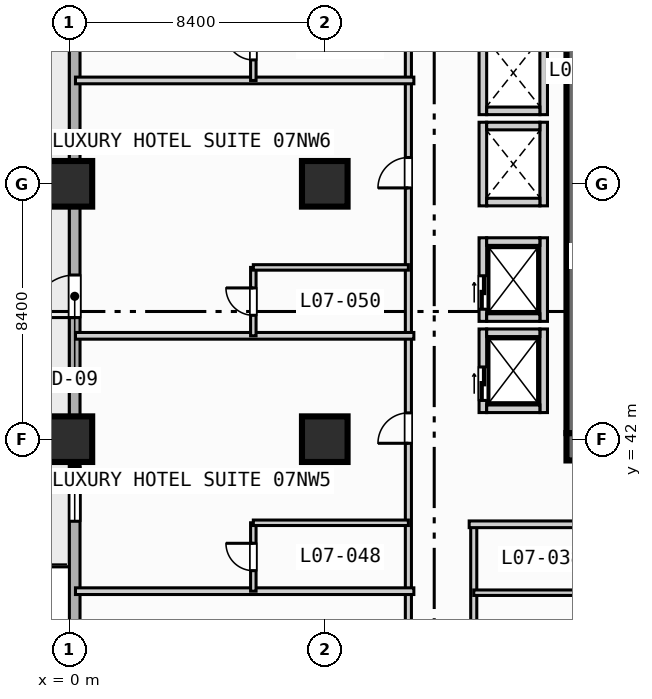
"""IFC4 building model, lengths in metres.
Left out: names, types, materials, properties, quantities, classifications, styles, units other than length and angle.
Written with IfcOpenShell. Run it as: python <this file> out.ifc"""

import sys

from ifc_helpers import new_model, si_unit, direction, frame, frame_2d, origin, origin_2d, place, context, subcontext, project, spatial, rectangle, extrude, element, fill, save


model = new_model("IFC4")
c1 = context("Model", 3, precision=1e-05, world=origin(), true_north=direction((0.0, 1.0)))
c2 = subcontext(c1, "Body", "Model", "MODEL_VIEW")
j1 = project(units=[si_unit("LENGTHUNIT", "METRE"), si_unit("PLANEANGLEUNIT", "RADIAN")], contexts=[c1])
p1 = place(None, origin())
s1 = spatial("IfcSite", under=j1, at=p1, CompositionType="ELEMENT")
p2 = place(p1, origin())
s2 = spatial("IfcBuilding", under=s1, at=p2, CompositionType="ELEMENT")
p3 = place(p2, frame((0.0, 0.0, 35.8)))
s3 = spatial("IfcBuildingStorey", under=s2, at=p3, CompositionType="ELEMENT", Elevation=35.8)
p4 = place(p3, frame((16.35, 41.75, 0.0), z_axis=(0.0, 0.0, 1.0), x_axis=(1.0, 0.0, 0.0)))
e1 = element("IfcWall", 1, at=p4, inside=s3, PredefinedType="SHEAR", context=c2, shape_type="SweptSolid", body=[
    extrude(rectangle(XDim=1.65, YDim=0.9, at=frame_2d((0.825, 0.0))), origin(), (0.0, 0.0, 1.0), 3.55),
])
p5 = place(p3, frame((16.8, 42.2, 0.0), z_axis=(0.0, 0.0, 1.0), x_axis=(0.0, 1.0, 0.0)))
e2 = element("IfcWall", 2, at=p5, inside=s3, PredefinedType="SHEAR", context=c2, shape_type="SweptSolid", body=[
    extrude(rectangle(XDim=16.35, YDim=0.9, at=frame_2d((8.175, 0.0))), origin(), (0.0, 0.0, 1.0), 3.55),
])
for number, where, z_axis, x_axis in (
    (3, (0.0, 42.0, 0.0), (0.0, 0.0, 1.0), (1.0, 0.0, 0.0)),
    (4, (0.0, 50.4, 0.0), (0.0, 0.0, 1.0), (1.0, 0.0, 0.0)),
    (5, (8.4, 42.0, 0.0), (0.0, 0.0, 1.0), (1.0, 0.0, 0.0)),
    (6, (8.4, 50.4, 0.0), (0.0, 0.0, 1.0), (1.0, 0.0, 0.0)),
):
    element("IfcColumn", number, at=place(p3, frame(where, z_axis=z_axis, x_axis=x_axis)), inside=s3, PredefinedType="COLUMN", context=c2, shape_type="SweptSolid", body=[
        extrude(rectangle(XDim=1.5, YDim=1.5, at=origin_2d()), origin(), (0.0, 0.0, 1.0), 3.8),
    ])
p6 = place(p3, frame((0.175, 3.175, 0.0), z_axis=(0.0, 0.0, 1.0), x_axis=(0.0, 1.0, 0.0)))
e7 = element("IfcWall", 7, at=p6, inside=s3, PredefinedType="STANDARD", context=c2, shape_type="SweptSolid", body=[
    extrude(rectangle(XDim=86.05, YDim=0.35, at=frame_2d((43.025, 0.0))), origin(), (0.0, 0.0, 1.0), 3.55),
])
p7 = place(p6, frame((42.825, 0.0, 0.0)))
e8 = element("IfcOpeningElement", 8, at=p7, cuts=e7, PredefinedType="OPENING", context=c2, shape_type="SweptSolid", body=[
    extrude(rectangle(XDim=1.4, YDim=2.2, at=frame_2d((0.7, 1.1))), frame((0.0, 0.185, 0.0), z_axis=(0.0, -1.0, 0.0), x_axis=(1.0, 0.0, 0.0)), (0.0, 0.0, 1.0), 0.37),
])
p8 = place(p6, frame((2.525, 0.0, 0.85)))
e9 = element("IfcOpeningElement", 9, at=p8, cuts=e7, PredefinedType="OPENING", context=c2, shape_type="SweptSolid", body=[
    extrude(rectangle(XDim=1.8, YDim=1.8, at=frame_2d((0.9, 0.9))), frame((0.0, 0.185, 0.0), z_axis=(0.0, -1.0, 0.0), x_axis=(1.0, 0.0, 0.0)), (0.0, 0.0, 1.0), 0.37),
])
p9 = place(p6, frame((10.925, 0.0, 0.85)))
e10 = element("IfcOpeningElement", 10, at=p9, cuts=e7, PredefinedType="OPENING", context=c2, shape_type="SweptSolid", body=[
    extrude(rectangle(XDim=1.8, YDim=1.8, at=frame_2d((0.9, 0.9))), frame((0.0, 0.185, 0.0), z_axis=(0.0, -1.0, 0.0), x_axis=(1.0, 0.0, 0.0)), (0.0, 0.0, 1.0), 0.37),
])
p10 = place(p6, frame((19.325, 0.0, 0.85)))
e11 = element("IfcOpeningElement", 11, at=p10, cuts=e7, PredefinedType="OPENING", context=c2, shape_type="SweptSolid", body=[
    extrude(rectangle(XDim=1.8, YDim=1.8, at=frame_2d((0.9, 0.9))), frame((0.0, 0.185, 0.0), z_axis=(0.0, -1.0, 0.0), x_axis=(1.0, 0.0, 0.0)), (0.0, 0.0, 1.0), 0.37),
])
p11 = place(p6, frame((27.725, 0.0, 0.85)))
e12 = element("IfcOpeningElement", 12, at=p11, cuts=e7, PredefinedType="OPENING", context=c2, shape_type="SweptSolid", body=[
    extrude(rectangle(XDim=1.8, YDim=1.8, at=frame_2d((0.9, 0.9))), frame((0.0, 0.185, 0.0), z_axis=(0.0, -1.0, 0.0), x_axis=(1.0, 0.0, 0.0)), (0.0, 0.0, 1.0), 0.37),
])
p12 = place(p6, frame((36.125, 0.0, 0.85)))
e13 = element("IfcOpeningElement", 13, at=p12, cuts=e7, PredefinedType="OPENING", context=c2, shape_type="SweptSolid", body=[
    extrude(rectangle(XDim=1.8, YDim=1.8, at=frame_2d((0.9, 0.9))), frame((0.0, 0.185, 0.0), z_axis=(0.0, -1.0, 0.0), x_axis=(1.0, 0.0, 0.0)), (0.0, 0.0, 1.0), 0.37),
])
p13 = place(p6, frame((52.925, 0.0, 0.85)))
e14 = element("IfcOpeningElement", 14, at=p13, cuts=e7, PredefinedType="OPENING", context=c2, shape_type="SweptSolid", body=[
    extrude(rectangle(XDim=1.8, YDim=1.8, at=frame_2d((0.9, 0.9))), frame((0.0, 0.185, 0.0), z_axis=(0.0, -1.0, 0.0), x_axis=(1.0, 0.0, 0.0)), (0.0, 0.0, 1.0), 0.37),
])
p14 = place(p6, frame((61.325, 0.0, 0.85)))
e15 = element("IfcOpeningElement", 15, at=p14, cuts=e7, PredefinedType="OPENING", context=c2, shape_type="SweptSolid", body=[
    extrude(rectangle(XDim=1.8, YDim=1.8, at=frame_2d((0.9, 0.9))), frame((0.0, 0.185, 0.0), z_axis=(0.0, -1.0, 0.0), x_axis=(1.0, 0.0, 0.0)), (0.0, 0.0, 1.0), 0.37),
])
p15 = place(p6, frame((69.725, 0.0, 0.85)))
e16 = element("IfcOpeningElement", 16, at=p15, cuts=e7, PredefinedType="OPENING", context=c2, shape_type="SweptSolid", body=[
    extrude(rectangle(XDim=1.8, YDim=1.8, at=frame_2d((0.9, 0.9))), frame((0.0, 0.185, 0.0), z_axis=(0.0, -1.0, 0.0), x_axis=(1.0, 0.0, 0.0)), (0.0, 0.0, 1.0), 0.37),
])
p16 = place(p6, frame((78.075, 0.0, 0.85)))
e17 = element("IfcOpeningElement", 17, at=p16, cuts=e7, PredefinedType="OPENING", context=c2, shape_type="SweptSolid", body=[
    extrude(rectangle(XDim=1.8, YDim=1.8, at=frame_2d((0.9, 0.9))), frame((0.0, 0.185, 0.0), z_axis=(0.0, -1.0, 0.0), x_axis=(1.0, 0.0, 0.0)), (0.0, 0.0, 1.0), 0.37),
])
p17 = place(p3, frame((13.6, 42.875, 0.0), z_axis=(0.0, 0.0, 1.0), x_axis=(0.0, 1.0, 0.0)))
e18 = element("IfcWall", 18, at=p17, inside=s3, PredefinedType="SOLIDWALL", context=c2, shape_type="SweptSolid", body=[
    extrude(rectangle(XDim=2.75, YDim=0.25, at=frame_2d((1.375, 0.0))), origin(), (0.0, 0.0, 1.0), 3.55),
])
p18 = place(p17, frame((0.4, 0.0, 0.0)))
e19 = element("IfcOpeningElement", 19, at=p18, cuts=e18, PredefinedType="OPENING", context=c2, shape_type="SweptSolid", body=[
    extrude(rectangle(XDim=1.1, YDim=2.15, at=frame_2d((0.55, 1.075))), frame((0.0, 0.135, 0.0), z_axis=(0.0, -1.0, 0.0), x_axis=(1.0, 0.0, 0.0)), (0.0, 0.0, 1.0), 0.27),
])
p19 = place(p3, frame((15.6, 42.875, 0.0), z_axis=(0.0, 0.0, 1.0), x_axis=(0.0, 1.0, 0.0)))
e20 = element("IfcWall", 20, at=p19, inside=s3, PredefinedType="SOLIDWALL", context=c2, shape_type="SweptSolid", body=[
    extrude(rectangle(XDim=2.75, YDim=0.25, at=frame_2d((1.375, 0.0))), origin(), (0.0, 0.0, 1.0), 3.55),
])
for number, where, z_axis, x_axis in (
    (21, (13.725, 43.0, 0.0), (0.0, 0.0, 1.0), (1.0, 0.0, 0.0)),
    (22, (13.725, 45.5, 0.0), (0.0, 0.0, 1.0), (1.0, 0.0, 0.0)),
):
    element("IfcWall", number, at=place(p3, frame(where, z_axis=z_axis, x_axis=x_axis)), inside=s3, PredefinedType="SOLIDWALL", context=c2, shape_type="SweptSolid", body=[
        extrude(rectangle(XDim=1.75, YDim=0.25, at=frame_2d((0.875, 0.0))), origin(), (0.0, 0.0, 1.0), 3.55),
    ])
p20 = place(p3, frame((13.6, 45.875, 0.0), z_axis=(0.0, 0.0, 1.0), x_axis=(0.0, 1.0, 0.0)))
e23 = element("IfcWall", 23, at=p20, inside=s3, PredefinedType="SOLIDWALL", context=c2, shape_type="SweptSolid", body=[
    extrude(rectangle(XDim=2.75, YDim=0.25, at=frame_2d((1.375, 0.0))), origin(), (0.0, 0.0, 1.0), 3.55),
])
p21 = place(p20, frame((0.4, 0.0, 0.0)))
e24 = element("IfcOpeningElement", 24, at=p21, cuts=e23, PredefinedType="OPENING", context=c2, shape_type="SweptSolid", body=[
    extrude(rectangle(XDim=1.1, YDim=2.15, at=frame_2d((0.55, 1.075))), frame((0.0, 0.135, 0.0), z_axis=(0.0, -1.0, 0.0), x_axis=(1.0, 0.0, 0.0)), (0.0, 0.0, 1.0), 0.27),
])
p22 = place(p3, frame((15.6, 45.875, 0.0), z_axis=(0.0, 0.0, 1.0), x_axis=(0.0, 1.0, 0.0)))
e25 = element("IfcWall", 25, at=p22, inside=s3, PredefinedType="SOLIDWALL", context=c2, shape_type="SweptSolid", body=[
    extrude(rectangle(XDim=2.75, YDim=0.25, at=frame_2d((1.375, 0.0))), origin(), (0.0, 0.0, 1.0), 3.55),
])
for number, where, z_axis, x_axis in (
    (26, (13.725, 46.0, 0.0), (0.0, 0.0, 1.0), (1.0, 0.0, 0.0)),
    (27, (13.725, 48.5, 0.0), (0.0, 0.0, 1.0), (1.0, 0.0, 0.0)),
):
    element("IfcWall", number, at=place(p3, frame(where, z_axis=z_axis, x_axis=x_axis)), inside=s3, PredefinedType="SOLIDWALL", context=c2, shape_type="SweptSolid", body=[
        extrude(rectangle(XDim=1.75, YDim=0.25, at=frame_2d((0.875, 0.0))), origin(), (0.0, 0.0, 1.0), 3.55),
    ])
for number, where, z_axis, x_axis in (
    (28, (13.6, 49.675, 0.0), (0.0, 0.0, 1.0), (0.0, 1.0, 0.0)),
    (29, (15.6, 49.675, 0.0), (0.0, 0.0, 1.0), (0.0, 1.0, 0.0)),
):
    element("IfcWall", number, at=place(p3, frame(where, z_axis=z_axis, x_axis=x_axis)), inside=s3, PredefinedType="SOLIDWALL", context=c2, shape_type="SweptSolid", body=[
        extrude(rectangle(XDim=2.75, YDim=0.25, at=frame_2d((1.375, 0.0))), origin(), (0.0, 0.0, 1.0), 3.55),
    ])
for number, where, z_axis, x_axis in (
    (30, (13.725, 49.8, 0.0), (0.0, 0.0, 1.0), (1.0, 0.0, 0.0)),
    (31, (13.725, 52.3, 0.0), (0.0, 0.0, 1.0), (1.0, 0.0, 0.0)),
):
    element("IfcWall", number, at=place(p3, frame(where, z_axis=z_axis, x_axis=x_axis)), inside=s3, PredefinedType="SOLIDWALL", context=c2, shape_type="SweptSolid", body=[
        extrude(rectangle(XDim=1.75, YDim=0.25, at=frame_2d((0.875, 0.0))), origin(), (0.0, 0.0, 1.0), 3.55),
    ])
for number, where, z_axis, x_axis in (
    (32, (13.6, 52.675, 0.0), (0.0, 0.0, 1.0), (0.0, 1.0, 0.0)),
    (33, (15.6, 52.675, 0.0), (0.0, 0.0, 1.0), (0.0, 1.0, 0.0)),
):
    element("IfcWall", number, at=place(p3, frame(where, z_axis=z_axis, x_axis=x_axis)), inside=s3, PredefinedType="SOLIDWALL", context=c2, shape_type="SweptSolid", body=[
        extrude(rectangle(XDim=2.75, YDim=0.25, at=frame_2d((1.375, 0.0))), origin(), (0.0, 0.0, 1.0), 3.55),
    ])
p23 = place(p3, frame((13.725, 52.8, 0.0), z_axis=(0.0, 0.0, 1.0), x_axis=(1.0, 0.0, 0.0)))
e34 = element("IfcWall", 34, at=p23, inside=s3, PredefinedType="SOLIDWALL", context=c2, shape_type="SweptSolid", body=[
    extrude(rectangle(XDim=1.75, YDim=0.25, at=frame_2d((0.875, 0.0))), origin(), (0.0, 0.0, 1.0), 3.55),
])
p24 = place(p3, frame((13.3, 25.6, 0.0), z_axis=(0.0, 0.0, 1.0), x_axis=(0.0, 1.0, 0.0)))
e35 = element("IfcWall", 35, at=p24, inside=s3, PredefinedType="PARTITIONING", context=c2, shape_type="SweptSolid", body=[
    extrude(rectangle(XDim=13.6, YDim=0.2, at=frame_2d((6.8, 0.0))), origin(), (0.0, 0.0, 1.0), 3.55),
])
p25 = place(p24, frame((1.735, 0.0, 0.0)))
e36 = element("IfcOpeningElement", 36, at=p25, cuts=e35, PredefinedType="OPENING", context=c2, shape_type="SweptSolid", body=[
    extrude(rectangle(XDim=1.0, YDim=2.15, at=frame_2d((0.5, 1.075))), frame((0.0, 0.11, 0.0), z_axis=(0.0, -1.0, 0.0), x_axis=(1.0, 0.0, 0.0)), (0.0, 0.0, 1.0), 0.22),
])
p26 = place(p24, frame((8.535, 0.0, 0.0)))
e37 = element("IfcOpeningElement", 37, at=p26, cuts=e35, PredefinedType="OPENING", context=c2, shape_type="SweptSolid", body=[
    extrude(rectangle(XDim=1.0, YDim=2.15, at=frame_2d((0.5, 1.075))), frame((0.0, 0.11, 0.0), z_axis=(0.0, -1.0, 0.0), x_axis=(1.0, 0.0, 0.0)), (0.0, 0.0, 1.0), 0.22),
])
p27 = place(p3, frame((13.15, 39.2, 0.0), z_axis=(0.0, 0.0, 1.0), x_axis=(1.0, 0.0, 0.0)))
e38 = element("IfcWall", 38, at=p27, inside=s3, PredefinedType="PARTITIONING", context=c2, shape_type="SweptSolid", body=[
    extrude(rectangle(XDim=20.28, YDim=0.22, at=frame_2d((10.14, 0.0))), origin(), (0.0, 0.0, 1.0), 3.55),
])
p28 = place(p3, frame((13.3, 36.95, 0.0), z_axis=(0.0, 0.0, 1.0), x_axis=(1.0, 0.0, 0.0)))
e39 = element("IfcWall", 39, at=p28, inside=s3, PredefinedType="PLUMBINGWALL", context=c2, shape_type="SweptSolid", body=[
    extrude(rectangle(XDim=5.1, YDim=0.18, at=frame_2d((2.55, 0.0))), origin(), (0.0, 0.0, 1.0), 3.55),
])
p29 = place(p3, frame((11.15, 3.4, 0.0), z_axis=(0.0, 0.0, 1.0), x_axis=(0.0, 1.0, 0.0)))
e40 = element("IfcWall", 40, at=p29, inside=s3, PredefinedType="PARTITIONING", context=c2, shape_type="SweptSolid", body=[
    extrude(rectangle(XDim=85.4, YDim=0.2, at=frame_2d((42.7, 0.0))), origin(), (0.0, 0.0, 1.0), 3.55),
])
p30 = place(p29, frame((4.865, 0.0, 0.0)))
e41 = element("IfcOpeningElement", 41, at=p30, cuts=e40, PredefinedType="OPENING", context=c2, shape_type="SweptSolid", body=[
    extrude(rectangle(XDim=1.0, YDim=2.15, at=frame_2d((0.5, 1.075))), frame((0.0, 0.11, 0.0), z_axis=(0.0, -1.0, 0.0), x_axis=(1.0, 0.0, 0.0)), (0.0, 0.0, 1.0), 0.22),
])
p31 = place(p29, frame((13.265, 0.0, 0.0)))
e42 = element("IfcOpeningElement", 42, at=p31, cuts=e40, PredefinedType="OPENING", context=c2, shape_type="SweptSolid", body=[
    extrude(rectangle(XDim=1.0, YDim=2.15, at=frame_2d((0.5, 1.075))), frame((0.0, 0.11, 0.0), z_axis=(0.0, -1.0, 0.0), x_axis=(1.0, 0.0, 0.0)), (0.0, 0.0, 1.0), 0.22),
])
p32 = place(p29, frame((21.665, 0.0, 0.0)))
e43 = element("IfcOpeningElement", 43, at=p32, cuts=e40, PredefinedType="OPENING", context=c2, shape_type="SweptSolid", body=[
    extrude(rectangle(XDim=1.0, YDim=2.15, at=frame_2d((0.5, 1.075))), frame((0.0, 0.11, 0.0), z_axis=(0.0, -1.0, 0.0), x_axis=(1.0, 0.0, 0.0)), (0.0, 0.0, 1.0), 0.22),
])
p33 = place(p29, frame((30.065, 0.0, 0.0)))
e44 = element("IfcOpeningElement", 44, at=p33, cuts=e40, PredefinedType="OPENING", context=c2, shape_type="SweptSolid", body=[
    extrude(rectangle(XDim=1.0, YDim=2.15, at=frame_2d((0.5, 1.075))), frame((0.0, 0.11, 0.0), z_axis=(0.0, -1.0, 0.0), x_axis=(1.0, 0.0, 0.0)), (0.0, 0.0, 1.0), 0.22),
])
p34 = place(p29, frame((38.465, 0.0, 0.0)))
e45 = element("IfcOpeningElement", 45, at=p34, cuts=e40, PredefinedType="OPENING", context=c2, shape_type="SweptSolid", body=[
    extrude(rectangle(XDim=1.0, YDim=2.15, at=frame_2d((0.5, 1.075))), frame((0.0, 0.11, 0.0), z_axis=(0.0, -1.0, 0.0), x_axis=(1.0, 0.0, 0.0)), (0.0, 0.0, 1.0), 0.22),
])
p35 = place(p29, frame((46.865, 0.0, 0.0)))
e46 = element("IfcOpeningElement", 46, at=p35, cuts=e40, PredefinedType="OPENING", context=c2, shape_type="SweptSolid", body=[
    extrude(rectangle(XDim=1.0, YDim=2.15, at=frame_2d((0.5, 1.075))), frame((0.0, 0.11, 0.0), z_axis=(0.0, -1.0, 0.0), x_axis=(1.0, 0.0, 0.0)), (0.0, 0.0, 1.0), 0.22),
])
p36 = place(p29, frame((55.265, 0.0, 0.0)))
e47 = element("IfcOpeningElement", 47, at=p36, cuts=e40, PredefinedType="OPENING", context=c2, shape_type="SweptSolid", body=[
    extrude(rectangle(XDim=1.0, YDim=2.15, at=frame_2d((0.5, 1.075))), frame((0.0, 0.11, 0.0), z_axis=(0.0, -1.0, 0.0), x_axis=(1.0, 0.0, 0.0)), (0.0, 0.0, 1.0), 0.22),
])
p37 = place(p29, frame((63.665, 0.0, 0.0)))
e48 = element("IfcOpeningElement", 48, at=p37, cuts=e40, PredefinedType="OPENING", context=c2, shape_type="SweptSolid", body=[
    extrude(rectangle(XDim=1.0, YDim=2.15, at=frame_2d((0.5, 1.075))), frame((0.0, 0.11, 0.0), z_axis=(0.0, -1.0, 0.0), x_axis=(1.0, 0.0, 0.0)), (0.0, 0.0, 1.0), 0.22),
])
p38 = place(p29, frame((72.065, 0.0, 0.0)))
e49 = element("IfcOpeningElement", 49, at=p38, cuts=e40, PredefinedType="OPENING", context=c2, shape_type="SweptSolid", body=[
    extrude(rectangle(XDim=1.0, YDim=2.15, at=frame_2d((0.5, 1.075))), frame((0.0, 0.11, 0.0), z_axis=(0.0, -1.0, 0.0), x_axis=(1.0, 0.0, 0.0)), (0.0, 0.0, 1.0), 0.22),
])
p39 = place(p29, frame((81.165, 0.0, 0.0)))
e50 = element("IfcOpeningElement", 50, at=p39, cuts=e40, PredefinedType="OPENING", context=c2, shape_type="SweptSolid", body=[
    extrude(rectangle(XDim=1.0, YDim=2.15, at=frame_2d((0.5, 1.075))), frame((0.0, 0.11, 0.0), z_axis=(0.0, -1.0, 0.0), x_axis=(1.0, 0.0, 0.0)), (0.0, 0.0, 1.0), 0.22),
])
p40 = place(p3, frame((0.2, 37.0, 0.0), z_axis=(0.0, 0.0, 1.0), x_axis=(1.0, 0.0, 0.0)))
e51 = element("IfcWall", 51, at=p40, inside=s3, PredefinedType="PARTITIONING", context=c2, shape_type="SweptSolid", body=[
    extrude(rectangle(XDim=11.13, YDim=0.22, at=frame_2d((5.565, 0.0))), origin(), (0.0, 0.0, 1.0), 3.55),
])
p41 = place(p3, frame((6.05, 37.0, 0.0), z_axis=(0.0, 0.0, 1.0), x_axis=(0.0, 1.0, 0.0)))
e52 = element("IfcWall", 52, at=p41, inside=s3, PredefinedType="PLUMBINGWALL", context=c2, shape_type="SweptSolid", body=[
    extrude(rectangle(XDim=2.25, YDim=0.18, at=frame_2d((1.125, 0.0))), origin(), (0.0, 0.0, 1.0), 3.55),
])
p42 = place(p41, frame((0.675, 0.0, 0.0)))
e53 = element("IfcOpeningElement", 53, at=p42, cuts=e52, PredefinedType="OPENING", context=c2, shape_type="SweptSolid", body=[
    extrude(rectangle(XDim=0.9, YDim=2.1, at=frame_2d((0.45, 1.05))), frame((0.0, 0.1, 0.0), z_axis=(0.0, -1.0, 0.0), x_axis=(1.0, 0.0, 0.0)), (0.0, 0.0, 1.0), 0.2),
])
p43 = place(p3, frame((6.05, 39.25, 0.0), z_axis=(0.0, 0.0, 1.0), x_axis=(1.0, 0.0, 0.0)))
e54 = element("IfcWall", 54, at=p43, inside=s3, PredefinedType="PLUMBINGWALL", context=c2, shape_type="SweptSolid", body=[
    extrude(rectangle(XDim=5.1, YDim=0.18, at=frame_2d((2.55, 0.0))), origin(), (0.0, 0.0, 1.0), 3.55),
])
p44 = place(p3, frame((0.2, 45.4, 0.0), z_axis=(0.0, 0.0, 1.0), x_axis=(1.0, 0.0, 0.0)))
e55 = element("IfcWall", 55, at=p44, inside=s3, PredefinedType="PARTITIONING", context=c2, shape_type="SweptSolid", body=[
    extrude(rectangle(XDim=11.13, YDim=0.22, at=frame_2d((5.565, 0.0))), origin(), (0.0, 0.0, 1.0), 3.55),
])
p45 = place(p3, frame((6.05, 45.4, 0.0), z_axis=(0.0, 0.0, 1.0), x_axis=(0.0, 1.0, 0.0)))
e56 = element("IfcWall", 56, at=p45, inside=s3, PredefinedType="PLUMBINGWALL", context=c2, shape_type="SweptSolid", body=[
    extrude(rectangle(XDim=2.25, YDim=0.18, at=frame_2d((1.125, 0.0))), origin(), (0.0, 0.0, 1.0), 3.55),
])
p46 = place(p45, frame((0.675, 0.0, 0.0)))
e57 = element("IfcOpeningElement", 57, at=p46, cuts=e56, PredefinedType="OPENING", context=c2, shape_type="SweptSolid", body=[
    extrude(rectangle(XDim=0.9, YDim=2.1, at=frame_2d((0.45, 1.05))), frame((0.0, 0.1, 0.0), z_axis=(0.0, -1.0, 0.0), x_axis=(1.0, 0.0, 0.0)), (0.0, 0.0, 1.0), 0.2),
])
p47 = place(p3, frame((6.05, 47.65, 0.0), z_axis=(0.0, 0.0, 1.0), x_axis=(1.0, 0.0, 0.0)))
e58 = element("IfcWall", 58, at=p47, inside=s3, PredefinedType="PLUMBINGWALL", context=c2, shape_type="SweptSolid", body=[
    extrude(rectangle(XDim=5.1, YDim=0.18, at=frame_2d((2.55, 0.0))), origin(), (0.0, 0.0, 1.0), 3.55),
])
p48 = place(p3, frame((0.2, 53.8, 0.0), z_axis=(0.0, 0.0, 1.0), x_axis=(1.0, 0.0, 0.0)))
e59 = element("IfcWall", 59, at=p48, inside=s3, PredefinedType="PARTITIONING", context=c2, shape_type="SweptSolid", body=[
    extrude(rectangle(XDim=11.13, YDim=0.22, at=frame_2d((5.565, 0.0))), origin(), (0.0, 0.0, 1.0), 3.55),
])
p49 = place(p3, frame((6.05, 53.8, 0.0), z_axis=(0.0, 0.0, 1.0), x_axis=(0.0, 1.0, 0.0)))
e60 = element("IfcWall", 60, at=p49, inside=s3, PredefinedType="PLUMBINGWALL", context=c2, shape_type="SweptSolid", body=[
    extrude(rectangle(XDim=2.25, YDim=0.18, at=frame_2d((1.125, 0.0))), origin(), (0.0, 0.0, 1.0), 3.55),
])
p50 = place(p49, frame((0.675, 0.0, 0.0)))
e61 = element("IfcOpeningElement", 61, at=p50, cuts=e60, PredefinedType="OPENING", context=c2, shape_type="SweptSolid", body=[
    extrude(rectangle(XDim=0.9, YDim=2.1, at=frame_2d((0.45, 1.05))), frame((0.0, 0.1, 0.0), z_axis=(0.0, -1.0, 0.0), x_axis=(1.0, 0.0, 0.0)), (0.0, 0.0, 1.0), 0.2),
])
p51 = place(p7, origin())
e62 = element("IfcDoor", 62, at=p51, inside=s3, OperationType="SINGLE_SWING_LEFT", PredefinedType="DOOR", context=c2, shape_type="SweptSolid", body=[
    extrude(rectangle(XDim=1.4, YDim=2.2, at=frame_2d((0.7, 1.1))), frame((0.0, 0.025, 0.0), z_axis=(0.0, -1.0, 0.0), x_axis=(1.0, 0.0, 0.0)), (0.0, 0.0, 1.0), 0.05),
])
fill(e8, e62)
p52 = place(p12, origin())
e63 = element("IfcWindow", 63, at=p52, inside=s3, PartitioningType="SINGLE_PANEL", PredefinedType="WINDOW", context=c2, shape_type="SweptSolid", body=[
    extrude(rectangle(XDim=1.8, YDim=1.8, at=frame_2d((0.9, 0.9))), frame((0.0, 0.03, 0.0), z_axis=(0.0, -1.0, 0.0), x_axis=(1.0, 0.0, 0.0)), (0.0, 0.0, 1.0), 0.06),
])
fill(e13, e63)
p53 = place(p18, origin())
e64 = element("IfcDoor", 64, at=p53, inside=s3, OperationType="SLIDING_TO_LEFT", PredefinedType="DOOR", context=c2, shape_type="SweptSolid", body=[
    extrude(rectangle(XDim=1.1, YDim=2.15, at=frame_2d((0.55, 1.075))), frame((0.0, 0.025, 0.0), z_axis=(0.0, -1.0, 0.0), x_axis=(1.0, 0.0, 0.0)), (0.0, 0.0, 1.0), 0.05),
])
fill(e19, e64)
p54 = place(p21, origin())
e65 = element("IfcDoor", 65, at=p54, inside=s3, OperationType="SLIDING_TO_LEFT", PredefinedType="DOOR", context=c2, shape_type="SweptSolid", body=[
    extrude(rectangle(XDim=1.1, YDim=2.15, at=frame_2d((0.55, 1.075))), frame((0.0, 0.025, 0.0), z_axis=(0.0, -1.0, 0.0), x_axis=(1.0, 0.0, 0.0)), (0.0, 0.0, 1.0), 0.05),
])
fill(e24, e65)
p55 = place(p34, origin())
e66 = element("IfcDoor", 66, at=p55, inside=s3, OperationType="SINGLE_SWING_LEFT", PredefinedType="DOOR", context=c2, shape_type="SweptSolid", body=[
    extrude(rectangle(XDim=1.0, YDim=2.15, at=frame_2d((0.5, 1.075))), frame((0.0, 0.025, 0.0), z_axis=(0.0, -1.0, 0.0), x_axis=(1.0, 0.0, 0.0)), (0.0, 0.0, 1.0), 0.05),
])
fill(e45, e66)
p56 = place(p35, origin())
e67 = element("IfcDoor", 67, at=p56, inside=s3, OperationType="SINGLE_SWING_LEFT", PredefinedType="DOOR", context=c2, shape_type="SweptSolid", body=[
    extrude(rectangle(XDim=1.0, YDim=2.15, at=frame_2d((0.5, 1.075))), frame((0.0, 0.025, 0.0), z_axis=(0.0, -1.0, 0.0), x_axis=(1.0, 0.0, 0.0)), (0.0, 0.0, 1.0), 0.05),
])
fill(e46, e67)
p57 = place(p42, origin())
e68 = element("IfcDoor", 68, at=p57, inside=s3, OperationType="SINGLE_SWING_RIGHT", PredefinedType="DOOR", context=c2, shape_type="SweptSolid", body=[
    extrude(rectangle(XDim=0.9, YDim=2.1, at=frame_2d((0.45, 1.05))), frame((0.0, 0.025, 0.0), z_axis=(0.0, -1.0, 0.0), x_axis=(1.0, 0.0, 0.0)), (0.0, 0.0, 1.0), 0.05),
])
fill(e53, e68)
p58 = place(p46, origin())
e69 = element("IfcDoor", 69, at=p58, inside=s3, OperationType="SINGLE_SWING_RIGHT", PredefinedType="DOOR", context=c2, shape_type="SweptSolid", body=[
    extrude(rectangle(XDim=0.9, YDim=2.1, at=frame_2d((0.45, 1.05))), frame((0.0, 0.025, 0.0), z_axis=(0.0, -1.0, 0.0), x_axis=(1.0, 0.0, 0.0)), (0.0, 0.0, 1.0), 0.05),
])
fill(e57, e69)
p59 = place(p50, origin())
e70 = element("IfcDoor", 70, at=p59, inside=s3, OperationType="SINGLE_SWING_RIGHT", PredefinedType="DOOR", context=c2, shape_type="SweptSolid", body=[
    extrude(rectangle(XDim=0.9, YDim=2.1, at=frame_2d((0.45, 1.05))), frame((0.0, 0.025, 0.0), z_axis=(0.0, -1.0, 0.0), x_axis=(1.0, 0.0, 0.0)), (0.0, 0.0, 1.0), 0.05),
])
fill(e61, e70)
save(model, sys.argv[1])
